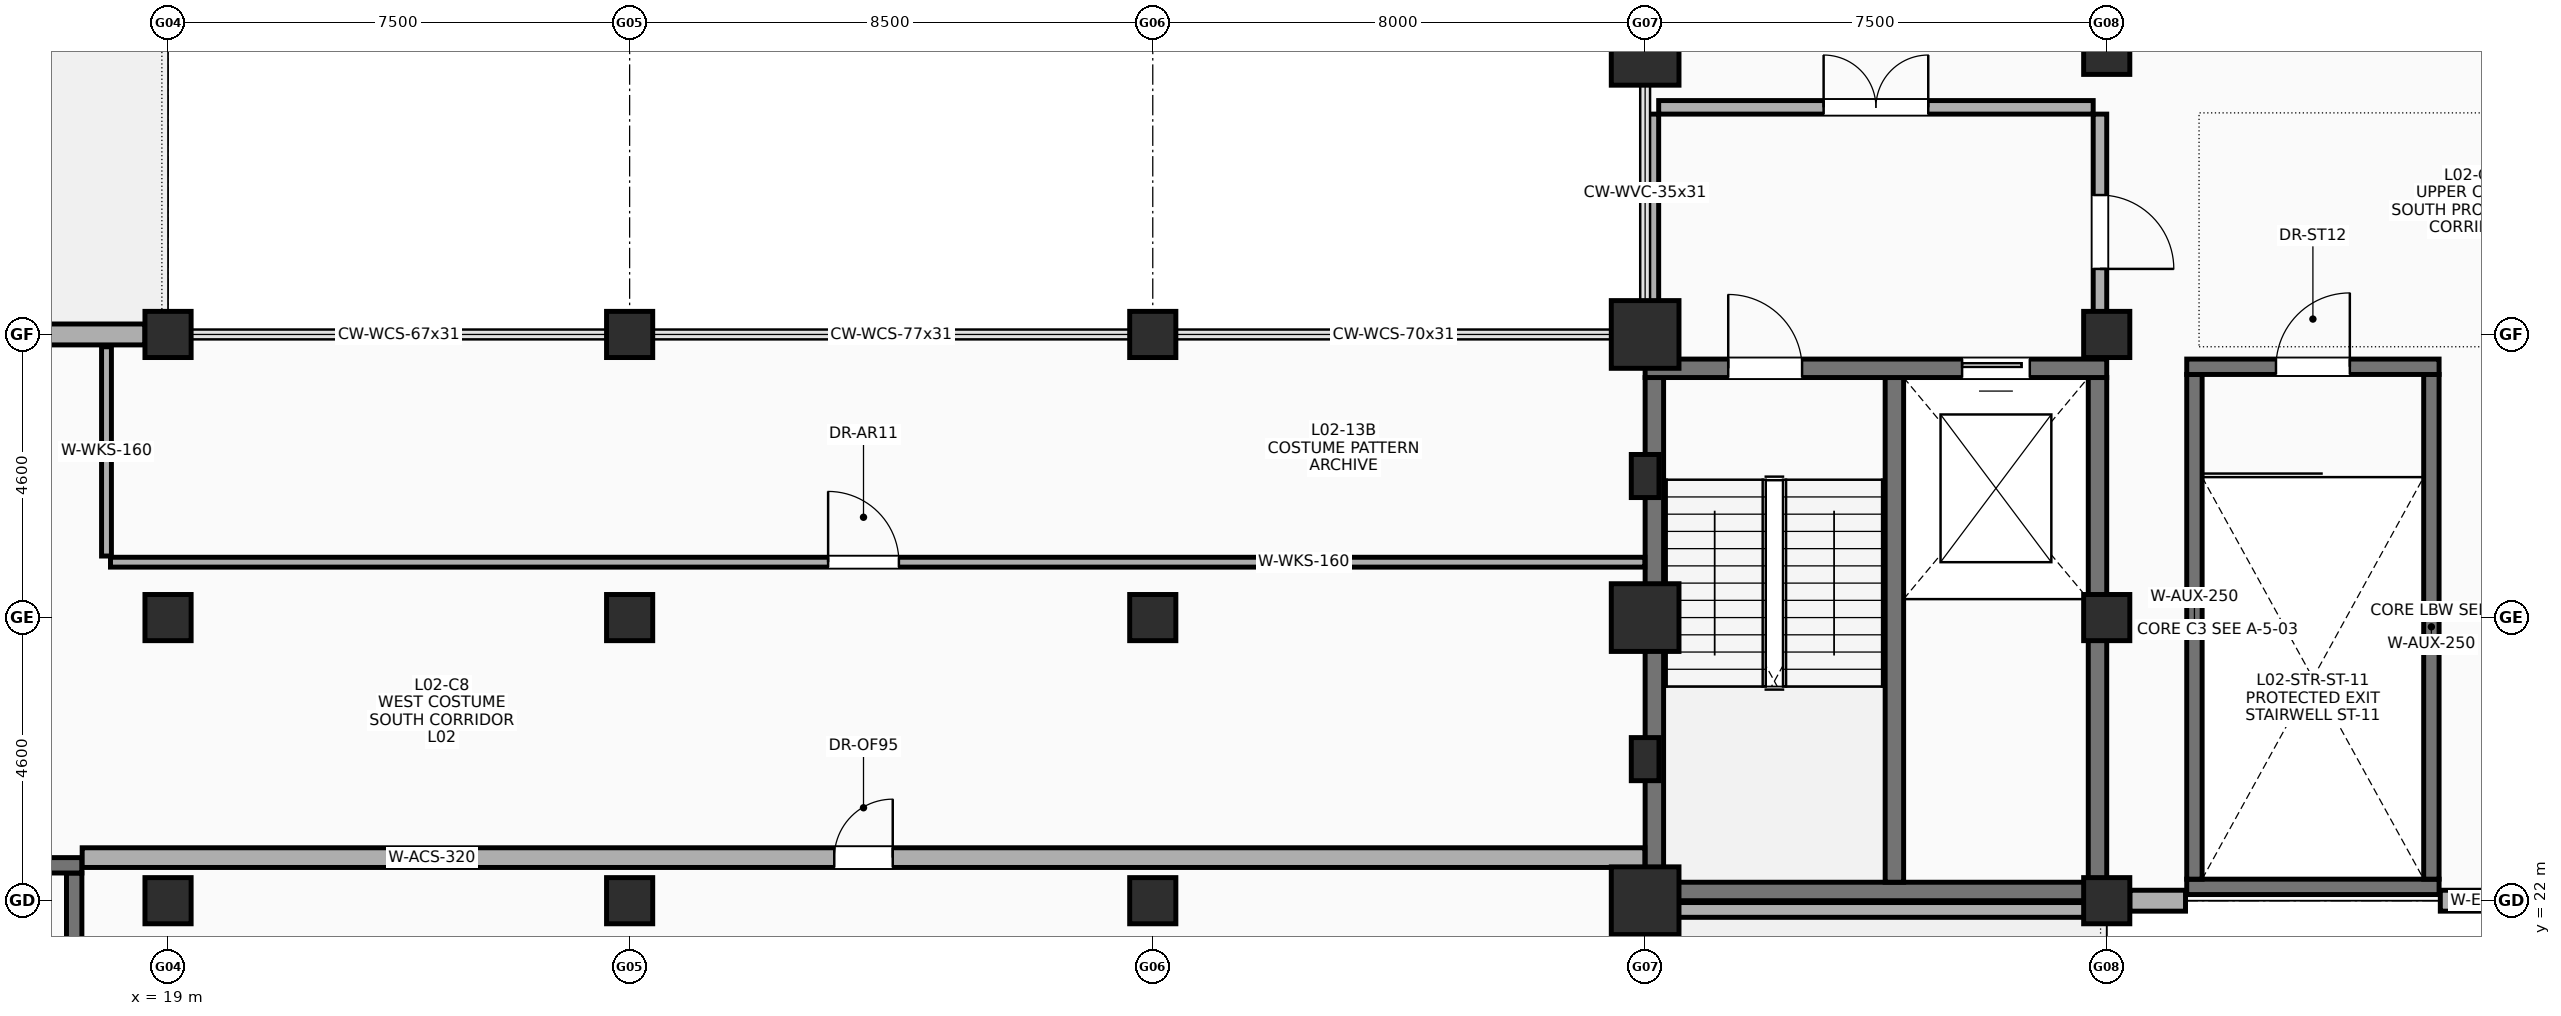
"""IFC4 building model, lengths in metres.
Left out: names, types, materials, properties, quantities, classifications, styles, units other than length and angle.
Written with IfcOpenShell. Run it as: python <this file> out.ifc"""

import sys

from ifc_helpers import new_model, si_unit, direction, frame, frame_2d, origin, origin_2d, place, context, subcontext, project, spatial, rectangle, extrude, element, fill, save


model = new_model("IFC4")
c1 = context("Model", 3, precision=1e-05, world=origin(), true_north=direction((0.0, 1.0)))
c2 = subcontext(c1, "Body", "Model", "MODEL_VIEW")
j1 = project(units=[si_unit("LENGTHUNIT", "METRE"), si_unit("PLANEANGLEUNIT", "RADIAN")], contexts=[c1])
p1 = place(None, origin())
s1 = spatial("IfcSite", under=j1, at=p1, CompositionType="ELEMENT")
p2 = place(p1, origin())
s2 = spatial("IfcBuilding", under=s1, at=p2, CompositionType="ELEMENT")
p3 = place(p2, frame((0.0, 0.0, 9.8)))
s3 = spatial("IfcBuildingStorey", under=s2, at=p3, CompositionType="ELEMENT", Elevation=9.8)
for number, where, z_axis, x_axis in (
    (1, (19.0, 22.0, 0.0), (0.0, 0.0, 1.0), (1.0, 0.0, 0.0)),
    (2, (19.0, 26.6, 0.0), (0.0, 0.0, 1.0), (1.0, 0.0, 0.0)),
    (3, (19.0, 31.2, 0.0), (0.0, 0.0, 1.0), (1.0, 0.0, 0.0)),
    (4, (26.5, 22.0, 0.0), (0.0, 0.0, 1.0), (1.0, 0.0, 0.0)),
    (5, (26.5, 26.6, 0.0), (0.0, 0.0, 1.0), (1.0, 0.0, 0.0)),
    (6, (26.5, 31.2, 0.0), (0.0, 0.0, 1.0), (1.0, 0.0, 0.0)),
    (7, (35.0, 22.0, 0.0), (0.0, 0.0, 1.0), (1.0, 0.0, 0.0)),
    (8, (35.0, 26.6, 0.0), (0.0, 0.0, 1.0), (1.0, 0.0, 0.0)),
    (9, (35.0, 31.2, 0.0), (0.0, 0.0, 1.0), (1.0, 0.0, 0.0)),
):
    element("IfcColumn", number, at=place(p3, frame(where, z_axis=z_axis, x_axis=x_axis)), inside=s3, PredefinedType="COLUMN", context=c2, shape_type="SweptSolid", body=[
        extrude(rectangle(XDim=0.75, YDim=0.75, at=origin_2d()), origin(), (0.0, 0.0, 1.0), 4.4),
    ])
for number, where, z_axis, x_axis in (
    (10, (43.0, 22.0, 0.0), (0.0, 0.0, 1.0), (1.0, 0.0, 0.0)),
    (11, (43.0, 26.6, 0.0), (0.0, 0.0, 1.0), (1.0, 0.0, 0.0)),
    (12, (43.0, 31.2, 0.0), (0.0, 0.0, 1.0), (1.0, 0.0, 0.0)),
    (13, (43.0, 35.8, 0.0), (0.0, 0.0, 1.0), (1.0, 0.0, 0.0)),
):
    element("IfcColumn", number, at=place(p3, frame(where, z_axis=z_axis, x_axis=x_axis)), inside=s3, PredefinedType="COLUMN", context=c2, shape_type="SweptSolid", body=[
        extrude(rectangle(XDim=1.1, YDim=1.1, at=origin_2d()), origin(), (0.0, 0.0, 1.0), 4.4),
    ])
for number, where, z_axis, x_axis in (
    (14, (50.5, 22.0, 0.0), (0.0, 0.0, 1.0), (1.0, 0.0, 0.0)),
    (15, (50.5, 26.6, 0.0), (0.0, 0.0, 1.0), (1.0, 0.0, 0.0)),
    (16, (50.5, 31.2, 0.0), (0.0, 0.0, 1.0), (1.0, 0.0, 0.0)),
    (17, (50.5, 35.8, 0.0), (0.0, 0.0, 1.0), (1.0, 0.0, 0.0)),
):
    element("IfcColumn", number, at=place(p3, frame(where, z_axis=z_axis, x_axis=x_axis)), inside=s3, PredefinedType="COLUMN", context=c2, shape_type="SweptSolid", body=[
        extrude(rectangle(XDim=0.75, YDim=0.75, at=origin_2d()), origin(), (0.0, 0.0, 1.0), 4.4),
    ])
for number, where, z_axis, x_axis in (
    (18, (43.0, 24.3, 0.0), (0.0, 0.0, 1.0), (1.0, 0.0, 0.0)),
    (19, (43.0, 28.9, 0.0), (0.0, 0.0, 1.0), (1.0, 0.0, 0.0)),
):
    element("IfcColumn", number, at=place(p3, frame(where, z_axis=z_axis, x_axis=x_axis)), inside=s3, PredefinedType="PILASTER", context=c2, shape_type="SweptSolid", body=[
        extrude(rectangle(XDim=0.45, YDim=0.7, at=origin_2d()), origin(), (0.0, 0.0, 1.0), 4.4),
    ])
p4 = place(p3, frame((43.0, 22.15, 0.0), z_axis=(0.0, 0.0, 1.0), x_axis=(1.0, 0.0, 0.0)))
e20 = element("IfcWall", 20, at=p4, inside=s3, PredefinedType="SHEAR", context=c2, shape_type="SweptSolid", body=[
    extrude(rectangle(XDim=7.5, YDim=0.3, at=frame_2d((3.75, 0.0))), origin(), (0.0, 0.0, 1.0), 4.4),
])
for number, where, z_axis, x_axis in (
    (21, (43.15, 22.3, 0.0), (0.0, 0.0, 1.0), (0.0, 1.0, 0.0)),
    (22, (50.35, 22.3, 0.0), (0.0, 0.0, 1.0), (0.0, 1.0, 0.0)),
    (23, (47.05, 22.3, 0.0), (0.0, 0.0, 1.0), (0.0, 1.0, 0.0)),
):
    element("IfcWall", number, at=place(p3, frame(where, z_axis=z_axis, x_axis=x_axis)), inside=s3, PredefinedType="SHEAR", context=c2, shape_type="SweptSolid", body=[
        extrude(rectangle(XDim=8.2, YDim=0.3, at=frame_2d((4.1, 0.0))), origin(), (0.0, 0.0, 1.0), 4.4),
    ])
p5 = place(p3, frame((43.0, 14.0, 0.0), z_axis=(0.0, 0.0, 1.0), x_axis=(0.0, 1.0, 0.0)))
e24 = element("IfcWall", 24, at=p5, inside=s3, PredefinedType="SOLIDWALL", context=c2, shape_type="SweptSolid", body=[
    extrude(rectangle(XDim=7.45, YDim=0.34, at=frame_2d((3.725, 0.0))), origin(), (0.0, 0.0, 1.0), 3.15),
])
p6 = place(p3, frame((13.875, 31.2, 0.0), z_axis=(0.0, 0.0, 1.0), x_axis=(1.0, 0.0, 0.0)))
e25 = element("IfcWall", 25, at=p6, inside=s3, PredefinedType="SOLIDWALL", context=c2, shape_type="SweptSolid", body=[
    extrude(rectangle(XDim=4.75, YDim=0.34, at=frame_2d((2.375, 0.0))), origin(), (0.0, 0.0, 1.0), 3.15),
])
p7 = place(p3, frame((43.15, 21.85, 0.0), z_axis=(0.0, 0.0, 1.0), x_axis=(1.0, 0.0, 0.0)))
e26 = element("IfcWall", 26, at=p7, inside=s3, PredefinedType="PARAPET", context=c2, shape_type="SweptSolid", body=[
    extrude(rectangle(XDim=7.2, YDim=0.24, at=frame_2d((3.6, 0.0))), origin(), (0.0, 0.0, 1.0), 0.65),
])
p8 = place(p3, frame((43.0, 30.65, 0.0), z_axis=(0.0, 0.0, 1.0), x_axis=(1.0, 0.0, 0.0)))
e27 = element("IfcWall", 27, at=p8, inside=s3, PredefinedType="SHEAR", context=c2, shape_type="SweptSolid", body=[
    extrude(rectangle(XDim=7.5, YDim=0.3, at=frame_2d((3.75, 0.0))), origin(), (0.0, 0.0, 1.0), 4.4),
])
p9 = place(p8, frame((1.35, 0.0, 0.0)))
e28 = element("IfcOpeningElement", 28, at=p9, cuts=e27, PredefinedType="OPENING", context=c2, shape_type="SweptSolid", body=[
    extrude(rectangle(XDim=1.2, YDim=2.15, at=frame_2d((0.6, 1.075))), frame((0.0, 0.16, 0.0), z_axis=(0.0, -1.0, 0.0), x_axis=(1.0, 0.0, 0.0)), (0.0, 0.0, 1.0), 0.32),
])
p10 = place(p8, frame((5.15, 0.0, 0.0)))
e29 = element("IfcOpeningElement", 29, at=p10, cuts=e27, PredefinedType="OPENING", context=c2, shape_type="SweptSolid", body=[
    extrude(rectangle(XDim=1.1, YDim=2.15, at=frame_2d((0.55, 1.075))), frame((0.0, 0.16, 0.0), z_axis=(0.0, -1.0, 0.0), x_axis=(1.0, 0.0, 0.0)), (0.0, 0.0, 1.0), 0.32),
])
p11 = place(p3, frame((43.22, 34.89, 0.0), z_axis=(0.0, 0.0, 1.0), x_axis=(1.0, 0.0, 0.0)))
e30 = element("IfcWall", 30, at=p11, inside=s3, PredefinedType="SOLIDWALL", context=c2, shape_type="SweptSolid", body=[
    extrude(rectangle(XDim=7.06, YDim=0.22, at=frame_2d((3.53, 0.0))), origin(), (0.0, 0.0, 1.0), 3.5),
])
p12 = place(p11, frame((2.68, 0.0, 0.0)))
e31 = element("IfcOpeningElement", 31, at=p12, cuts=e30, PredefinedType="OPENING", context=c2, shape_type="SweptSolid", body=[
    extrude(rectangle(XDim=1.7, YDim=2.18, at=frame_2d((0.85, 1.09))), frame((0.0, 0.12, 0.0), z_axis=(0.0, -1.0, 0.0), x_axis=(1.0, 0.0, 0.0)), (0.0, 0.0, 1.0), 0.24),
])
p13 = place(p3, frame((43.11, 30.95, 0.0), z_axis=(0.0, 0.0, 1.0), x_axis=(0.0, 1.0, 0.0)))
e32 = element("IfcWall", 32, at=p13, inside=s3, PredefinedType="SOLIDWALL", context=c2, shape_type="SweptSolid", body=[
    extrude(rectangle(XDim=3.83, YDim=0.22, at=frame_2d((1.915, 0.0))), origin(), (0.0, 0.0, 1.0), 3.5),
])
p14 = place(p3, frame((50.39, 30.95, 0.0), z_axis=(0.0, 0.0, 1.0), x_axis=(0.0, 1.0, 0.0)))
e33 = element("IfcWall", 33, at=p14, inside=s3, PredefinedType="SOLIDWALL", context=c2, shape_type="SweptSolid", body=[
    extrude(rectangle(XDim=3.83, YDim=0.22, at=frame_2d((1.915, 0.0))), origin(), (0.0, 0.0, 1.0), 3.3),
])
p15 = place(p14, frame((2.515, 0.0, 0.0), z_axis=(0.0, 0.0, 1.0), x_axis=(-1.0, 0.0, 0.0)))
e34 = element("IfcOpeningElement", 34, at=p15, cuts=e33, PredefinedType="OPENING", context=c2, shape_type="SweptSolid", body=[
    extrude(rectangle(XDim=1.2, YDim=2.15, at=frame_2d((0.6, 1.075))), frame((0.0, 0.12, 0.0), z_axis=(0.0, -1.0, 0.0), x_axis=(1.0, 0.0, 0.0)), (0.0, 0.0, 1.0), 0.24),
])
p16 = place(p3, frame((17.475, 14.25, 0.0), z_axis=(0.0, 0.0, 1.0), x_axis=(0.0, 1.0, 0.0)))
e35 = element("IfcWall", 35, at=p16, inside=s3, PredefinedType="SHEAR", context=c2, shape_type="SweptSolid", body=[
    extrude(rectangle(XDim=8.2, YDim=0.25, at=frame_2d((4.1, 0.0))), origin(), (0.0, 0.0, 1.0), 4.4),
])
p17 = place(p3, frame((13.5, 22.575, 0.0), z_axis=(0.0, 0.0, 1.0), x_axis=(1.0, 0.0, 0.0)))
e36 = element("IfcWall", 36, at=p17, inside=s3, PredefinedType="SHEAR", context=c2, shape_type="SweptSolid", body=[
    extrude(rectangle(XDim=4.1, YDim=0.25, at=frame_2d((2.05, 0.0))), origin(), (0.0, 0.0, 1.0), 4.4),
])
p18 = place(p17, frame((1.45, 0.0, 0.0)))
e37 = element("IfcOpeningElement", 37, at=p18, cuts=e36, PredefinedType="OPENING", context=c2, shape_type="SweptSolid", body=[
    extrude(rectangle(XDim=1.2, YDim=2.15, at=frame_2d((0.6, 1.075))), frame((0.0, 0.135, 0.0), z_axis=(0.0, -1.0, 0.0), x_axis=(1.0, 0.0, 0.0)), (0.0, 0.0, 1.0), 0.27),
])
p19 = place(p3, frame((51.8, 22.225, 0.0), z_axis=(0.0, 0.0, 1.0), x_axis=(1.0, 0.0, 0.0)))
e38 = element("IfcWall", 38, at=p19, inside=s3, PredefinedType="SHEAR", context=c2, shape_type="SweptSolid", body=[
    extrude(rectangle(XDim=4.1, YDim=0.25, at=frame_2d((2.05, 0.0))), origin(), (0.0, 0.0, 1.0), 4.4),
])
for number, where, z_axis, x_axis in (
    (39, (51.925, 22.35, 0.0), (0.0, 0.0, 1.0), (0.0, 1.0, 0.0)),
    (40, (55.775, 22.35, 0.0), (0.0, 0.0, 1.0), (0.0, 1.0, 0.0)),
):
    element("IfcWall", number, at=place(p3, frame(where, z_axis=z_axis, x_axis=x_axis)), inside=s3, PredefinedType="SHEAR", context=c2, shape_type="SweptSolid", body=[
        extrude(rectangle(XDim=8.2, YDim=0.25, at=frame_2d((4.1, 0.0))), origin(), (0.0, 0.0, 1.0), 4.4),
    ])
p20 = place(p3, frame((51.8, 30.675, 0.0), z_axis=(0.0, 0.0, 1.0), x_axis=(1.0, 0.0, 0.0)))
e41 = element("IfcWall", 41, at=p20, inside=s3, PredefinedType="SHEAR", context=c2, shape_type="SweptSolid", body=[
    extrude(rectangle(XDim=4.1, YDim=0.25, at=frame_2d((2.05, 0.0))), origin(), (0.0, 0.0, 1.0), 4.4),
])
p21 = place(p20, frame((1.45, 0.0, 0.0)))
e42 = element("IfcOpeningElement", 42, at=p21, cuts=e41, PredefinedType="OPENING", context=c2, shape_type="SweptSolid", body=[
    extrude(rectangle(XDim=1.2, YDim=2.15, at=frame_2d((0.6, 1.075))), frame((0.0, 0.135, 0.0), z_axis=(0.0, -1.0, 0.0), x_axis=(1.0, 0.0, 0.0)), (0.0, 0.0, 1.0), 0.27),
])
p22 = place(p3, frame((17.605, 22.7, 0.0), z_axis=(0.0, 0.0, 1.0), x_axis=(1.0, 0.0, 0.0)))
e43 = element("IfcWall", 43, at=p22, inside=s3, PredefinedType="PARTITIONING", context=c2, shape_type="SweptSolid", body=[
    extrude(rectangle(XDim=25.39, YDim=0.32, at=frame_2d((12.695, 0.0))), origin(), (0.0, 0.0, 1.0), 3.5),
])
p23 = place(p22, frame((12.22, 0.0, 0.0)))
e44 = element("IfcOpeningElement", 44, at=p23, cuts=e43, PredefinedType="OPENING", context=c2, shape_type="SweptSolid", body=[
    extrude(rectangle(XDim=0.95, YDim=2.15, at=frame_2d((0.475, 1.075))), frame((0.0, 0.17, 0.0), z_axis=(0.0, -1.0, 0.0), x_axis=(1.0, 0.0, 0.0)), (0.0, 0.0, 1.0), 0.34),
])
p24 = place(p3, frame((18.065, 27.5, 0.0), z_axis=(0.0, 0.0, 1.0), x_axis=(1.0, 0.0, 0.0)))
e45 = element("IfcWall", 45, at=p24, inside=s3, PredefinedType="PARTITIONING", context=c2, shape_type="SweptSolid", body=[
    extrude(rectangle(XDim=24.93, YDim=0.16, at=frame_2d((12.465, 0.0))), origin(), (0.0, 0.0, 1.0), 3.5),
])
p25 = place(p24, frame((11.66, 0.0, 0.0)))
e46 = element("IfcOpeningElement", 46, at=p25, cuts=e45, PredefinedType="OPENING", context=c2, shape_type="SweptSolid", body=[
    extrude(rectangle(XDim=1.15, YDim=2.18, at=frame_2d((0.575, 1.09))), frame((0.0, 0.09, 0.0), z_axis=(0.0, -1.0, 0.0), x_axis=(1.0, 0.0, 0.0)), (0.0, 0.0, 1.0), 0.18),
])
p26 = place(p3, frame((18.0, 27.6, 0.0), z_axis=(0.0, 0.0, 1.0), x_axis=(0.0, 1.0, 0.0)))
e47 = element("IfcWall", 47, at=p26, inside=s3, PredefinedType="PARTITIONING", context=c2, shape_type="SweptSolid", body=[
    extrude(rectangle(XDim=3.4, YDim=0.16, at=frame_2d((1.7, 0.0))), origin(), (0.0, 0.0, 1.0), 3.5),
])
p27 = place(p3, frame((50.875, 22.0, 0.0), z_axis=(0.0, 0.0, 1.0), x_axis=(1.0, 0.0, 0.0)))
e48 = element("IfcWall", 48, at=p27, inside=s3, PredefinedType="SOLIDWALL", context=c2, shape_type="SweptSolid", body=[
    extrude(rectangle(XDim=0.905, YDim=0.34, at=frame_2d((0.453, 0.0))), origin(), (0.0, 0.0, 1.0), 3.15),
])
p28 = place(p3, frame((55.92, 22.0, 0.0), z_axis=(0.0, 0.0, 1.0), x_axis=(1.0, 0.0, 0.0)))
e49 = element("IfcWall", 49, at=p28, inside=s3, PredefinedType="SOLIDWALL", context=c2, shape_type="SweptSolid", body=[
    extrude(rectangle(XDim=1.705, YDim=0.34, at=frame_2d((0.853, 0.0))), origin(), (0.0, 0.0, 1.0), 3.15),
])
p29 = place(p9, origin())
e50 = element("IfcDoor", 50, at=p29, inside=s3, OperationType="SINGLE_SWING_LEFT", PredefinedType="DOOR", context=c2, shape_type="SweptSolid", body=[
    extrude(rectangle(XDim=1.2, YDim=2.15, at=frame_2d((0.6, 1.075))), frame((0.0, 0.025, 0.0), z_axis=(0.0, -1.0, 0.0), x_axis=(1.0, 0.0, 0.0)), (0.0, 0.0, 1.0), 0.05),
])
fill(e28, e50)
p30 = place(p10, origin())
e51 = element("IfcDoor", 51, at=p30, inside=s3, OperationType="SLIDING_TO_LEFT", PredefinedType="DOOR", context=c2, shape_type="SweptSolid", body=[
    extrude(rectangle(XDim=1.1, YDim=2.15, at=frame_2d((0.55, 1.075))), frame((0.0, 0.025, 0.0), z_axis=(0.0, -1.0, 0.0), x_axis=(1.0, 0.0, 0.0)), (0.0, 0.0, 1.0), 0.05),
])
fill(e29, e51)
p31 = place(p12, origin())
e52 = element("IfcDoor", 52, at=p31, inside=s3, OperationType="DOUBLE_DOOR_SINGLE_SWING", PredefinedType="DOOR", context=c2, shape_type="SweptSolid", body=[
    extrude(rectangle(XDim=1.7, YDim=2.18, at=frame_2d((0.85, 1.09))), frame((0.0, 0.025, 0.0), z_axis=(0.0, -1.0, 0.0), x_axis=(1.0, 0.0, 0.0)), (0.0, 0.0, 1.0), 0.05),
])
fill(e31, e52)
p32 = place(p15, origin())
e53 = element("IfcDoor", 53, at=p32, inside=s3, OperationType="SINGLE_SWING_RIGHT", PredefinedType="DOOR", context=c2, shape_type="SweptSolid", body=[
    extrude(rectangle(XDim=1.2, YDim=2.15, at=frame_2d((0.6, 1.075))), frame((0.0, 0.025, 0.0), z_axis=(0.0, -1.0, 0.0), x_axis=(1.0, 0.0, 0.0)), (0.0, 0.0, 1.0), 0.05),
])
fill(e34, e53)
p33 = place(p21, origin())
e54 = element("IfcDoor", 54, at=p33, inside=s3, OperationType="SINGLE_SWING_RIGHT", PredefinedType="DOOR", context=c2, shape_type="SweptSolid", body=[
    extrude(rectangle(XDim=1.2, YDim=2.15, at=frame_2d((0.6, 1.075))), frame((0.0, 0.025, 0.0), z_axis=(0.0, -1.0, 0.0), x_axis=(1.0, 0.0, 0.0)), (0.0, 0.0, 1.0), 0.05),
])
fill(e42, e54)
p34 = place(p23, origin())
e55 = element("IfcDoor", 55, at=p34, inside=s3, OperationType="SINGLE_SWING_RIGHT", PredefinedType="DOOR", context=c2, shape_type="SweptSolid", body=[
    extrude(rectangle(XDim=0.95, YDim=2.15, at=frame_2d((0.475, 1.075))), frame((0.0, 0.025, 0.0), z_axis=(0.0, -1.0, 0.0), x_axis=(1.0, 0.0, 0.0)), (0.0, 0.0, 1.0), 0.05),
])
fill(e44, e55)
p35 = place(p25, origin())
e56 = element("IfcDoor", 56, at=p35, inside=s3, OperationType="SINGLE_SWING_LEFT", PredefinedType="DOOR", context=c2, shape_type="SweptSolid", body=[
    extrude(rectangle(XDim=1.15, YDim=2.18, at=frame_2d((0.575, 1.09))), frame((0.0, 0.025, 0.0), z_axis=(0.0, -1.0, 0.0), x_axis=(1.0, 0.0, 0.0)), (0.0, 0.0, 1.0), 0.05),
])
fill(e46, e56)
save(model, sys.argv[1])
